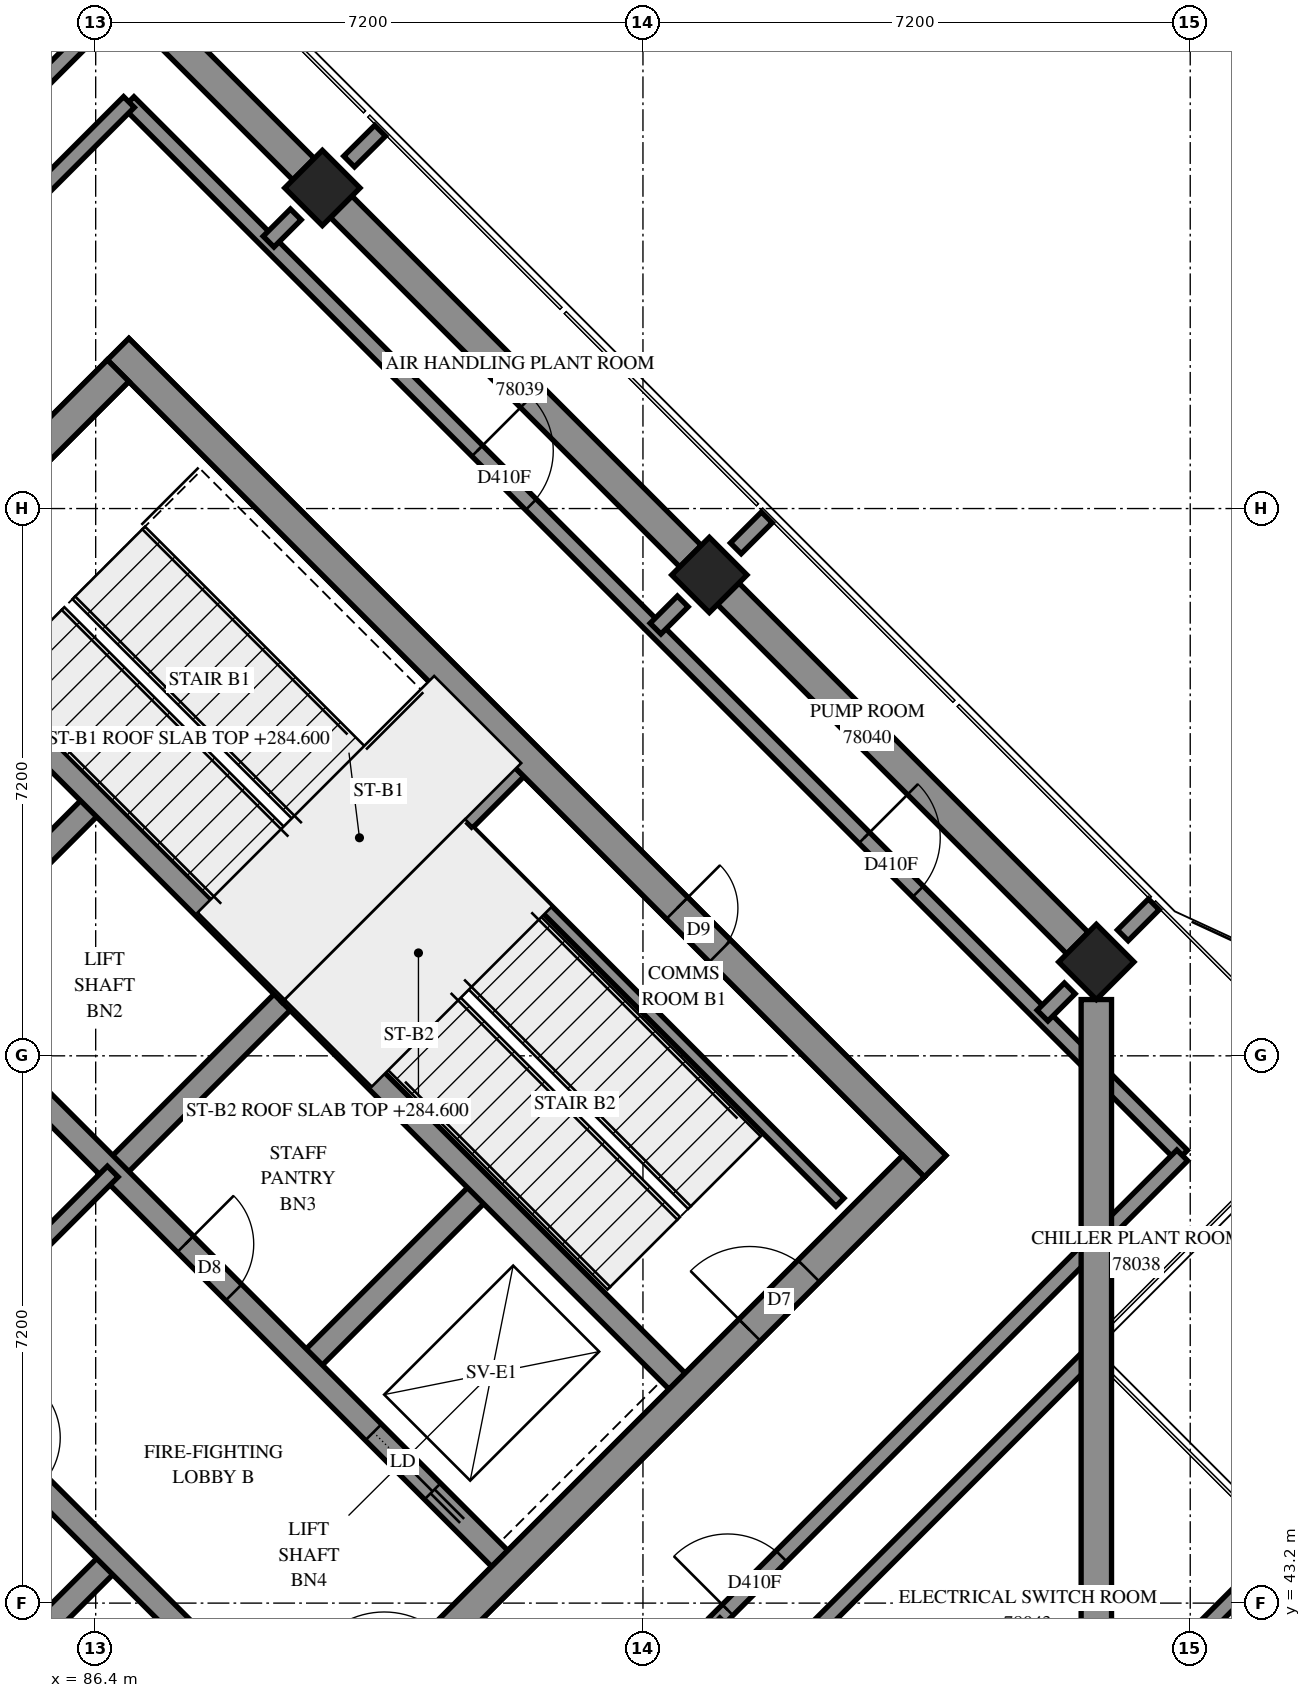
"""IFC4 building model, lengths in metres.
Left out: names, types, materials, properties, quantities, classifications, styles, units other than length and angle.
Written with IfcOpenShell. Run it as: python <this file> out.ifc"""

import sys

from ifc_helpers import new_model, si_unit, direction, frame, frame_2d, origin, origin_2d, place, context, subcontext, project, spatial, rectangle, extrude, element, fill, save


model = new_model("IFC4")
c1 = context("Model", 3, precision=1e-05, world=origin(), true_north=direction((0.0, 1.0)))
c2 = subcontext(c1, "Body", "Model", "MODEL_VIEW")
j1 = project(units=[si_unit("LENGTHUNIT", "METRE"), si_unit("PLANEANGLEUNIT", "RADIAN")], contexts=[c1])
p1 = place(None, origin())
s1 = spatial("IfcSite", under=j1, at=p1, CompositionType="ELEMENT")
p2 = place(p1, origin())
s2 = spatial("IfcBuilding", under=s1, at=p2, CompositionType="ELEMENT")
p3 = place(p2, frame((0.0, 0.0, 284.6)))
s3 = spatial("IfcBuildingStorey", under=s2, at=p3, CompositionType="ELEMENT", Elevation=284.6)
for number, where, z_axis, x_axis in (
    (1, (89.382, 61.818, 0.0), (0.0, 0.0, 1.0), (0.707, -0.707, 0.0)),
    (2, (94.474, 56.727, 0.0), (0.0, 0.0, 1.0), (0.707, -0.707, 0.0)),
    (3, (99.565, 51.635, 0.0), (0.0, 0.0, 1.0), (0.707, -0.707, 0.0)),
):
    element("IfcColumn", number, at=place(p3, frame(where, z_axis=z_axis, x_axis=x_axis)), inside=s3, PredefinedType="COLUMN", context=c2, shape_type="SweptSolid", body=[
        extrude(rectangle(XDim=0.7, YDim=0.7, at=origin_2d()), origin(), (0.0, 0.0, 1.0), 5.7),
    ])
p4 = place(p3, frame((76.23, 49.231, -0.3), z_axis=(0.0, 0.0, 1.0), x_axis=(0.7071034917, -0.7071100706, 0.0)))
e4 = element("IfcWall", 4, at=p4, inside=s3, PredefinedType="SHEAR", context=c2, shape_type="SweptSolid", body=[
    extrude(rectangle(XDim=15.2, YDim=0.4, at=frame_2d((7.6, 0.0))), origin(), (0.0, 0.0, 1.0), 5.3),
])
p5 = place(p3, frame((86.695, 59.696, -0.3), z_axis=(0.0, 0.0, 1.0), x_axis=(0.7071100706, -0.7071034917, 0.0)))
e5 = element("IfcWall", 5, at=p5, inside=s3, PredefinedType="SHEAR", context=c2, shape_type="SweptSolid", body=[
    extrude(rectangle(XDim=15.2, YDim=0.4, at=frame_2d((7.6, 0.0))), origin(), (0.0, 0.0, 1.0), 5.3),
])
p6 = place(p5, frame((10.4, 0.0, 0.3)))
e6 = element("IfcOpeningElement", 6, at=p6, cuts=e5, PredefinedType="OPENING", context=c2, shape_type="SweptSolid", body=[
    extrude(rectangle(XDim=0.8, YDim=2.1, at=frame_2d((0.4, 1.05))), frame((0.0, 0.21, 0.0), z_axis=(0.0, -1.0, 0.0), x_axis=(1.0, 0.0, 0.0)), (0.0, 0.0, 1.0), 0.42),
])
p7 = place(p3, frame((76.513, 49.231, -0.3), z_axis=(0.0, 0.0, 1.0), x_axis=(0.7071067812, 0.7071067812, 0.0)))
e7 = element("IfcWall", 7, at=p7, inside=s3, PredefinedType="SHEAR", context=c2, shape_type="SweptSolid", body=[
    extrude(rectangle(XDim=14.4, YDim=0.4, at=frame_2d((7.2, 0.0))), origin(), (0.0, 0.0, 1.0), 5.3),
])
p8 = place(p7, frame((4.55, 0.0, 0.3)))
e8 = element("IfcOpeningElement", 8, at=p8, cuts=e7, PredefinedType="OPENING", context=c2, shape_type="SweptSolid", body=[
    extrude(rectangle(XDim=1.1, YDim=2.1, at=frame_2d((0.55, 1.05))), frame((0.0, 0.21, 0.0), z_axis=(0.0, -1.0, 0.0), x_axis=(1.0, 0.0, 0.0)), (0.0, 0.0, 1.0), 0.42),
])
p9 = place(p7, frame((11.35, 0.0, 0.3)))
e9 = element("IfcOpeningElement", 9, at=p9, cuts=e7, PredefinedType="OPENING", context=c2, shape_type="SweptSolid", body=[
    extrude(rectangle(XDim=1.1, YDim=2.1, at=frame_2d((0.55, 1.05))), frame((0.0, 0.21, 0.0), z_axis=(0.0, -1.0, 0.0), x_axis=(1.0, 0.0, 0.0)), (0.0, 0.0, 1.0), 0.42),
])
p10 = place(p3, frame((86.978, 38.766, -0.3), z_axis=(0.0, 0.0, 1.0), x_axis=(0.7071067812, 0.7071067812, 0.0)))
e10 = element("IfcWall", 10, at=p10, inside=s3, PredefinedType="SHEAR", context=c2, shape_type="SweptSolid", body=[
    extrude(rectangle(XDim=14.4, YDim=0.4, at=frame_2d((7.2, 0.0))), origin(), (0.0, 0.0, 1.0), 5.3),
])
p11 = place(p10, frame((4.55, 0.0, 0.3)))
e11 = element("IfcOpeningElement", 11, at=p11, cuts=e10, PredefinedType="OPENING", context=c2, shape_type="SweptSolid", body=[
    extrude(rectangle(XDim=1.1, YDim=2.1, at=frame_2d((0.55, 1.05))), frame((0.0, 0.21, 0.0), z_axis=(0.0, -1.0, 0.0), x_axis=(1.0, 0.0, 0.0)), (0.0, 0.0, 1.0), 0.42),
])
p12 = place(p10, frame((11.35, 0.0, 0.3)))
e12 = element("IfcOpeningElement", 12, at=p12, cuts=e10, PredefinedType="OPENING", context=c2, shape_type="SweptSolid", body=[
    extrude(rectangle(XDim=1.1, YDim=2.1, at=frame_2d((0.55, 1.05))), frame((0.0, 0.21, 0.0), z_axis=(0.0, -1.0, 0.0), x_axis=(1.0, 0.0, 0.0)), (0.0, 0.0, 1.0), 0.42),
])
p13 = place(p3, frame((84.079, 51.423, 0.0), z_axis=(0.0, 0.0, 1.0), x_axis=(0.7071219326, 0.7070916295, 0.0)))
e13 = element("IfcWall", 13, at=p13, inside=s3, PredefinedType="SOLIDWALL", context=c2, shape_type="SweptSolid", body=[
    extrude(rectangle(XDim=3.3, YDim=0.3, at=frame_2d((1.65, 0.0))), origin(), (0.0, 0.0, 1.0), 5.7),
])
p14 = place(p3, frame((86.625, 48.878, 0.0), z_axis=(0.0, 0.0, 1.0), x_axis=(0.7071067812, 0.7071067812, 0.0)))
e14 = element("IfcWall", 14, at=p14, inside=s3, PredefinedType="SOLIDWALL", context=c2, shape_type="SweptSolid", body=[
    extrude(rectangle(XDim=3.3, YDim=0.3, at=frame_2d((1.65, 0.0))), origin(), (0.0, 0.0, 1.0), 5.7),
])
p15 = place(p3, frame((84.291, 41.453, 0.0), z_axis=(0.0, 0.0, 1.0), x_axis=(0.7071067812, 0.7071067812, 0.0)))
e15 = element("IfcWall", 15, at=p15, inside=s3, PredefinedType="SOLIDWALL", context=c2, shape_type="SweptSolid", body=[
    extrude(rectangle(XDim=3.3, YDim=0.3, at=frame_2d((1.65, 0.0))), origin(), (0.0, 0.0, 1.0), 5.7),
])
p16 = place(p3, frame((89.17, 46.332, 0.0), z_axis=(0.0, 0.0, 1.0), x_axis=(0.7071067812, 0.7071067812, 0.0)))
e16 = element("IfcWall", 16, at=p16, inside=s3, PredefinedType="SOLIDWALL", context=c2, shape_type="SweptSolid", body=[
    extrude(rectangle(XDim=3.3, YDim=0.3, at=frame_2d((1.65, 0.0))), origin(), (0.0, 0.0, 1.0), 5.7),
])
p17 = place(p3, frame((78.988, 51.423, 0.0), z_axis=(0.0, 0.0, 1.0), x_axis=(0.7071067812, -0.7071067812, 0.0)))
e17 = element("IfcWall", 17, at=p17, inside=s3, PredefinedType="SOLIDWALL", context=c2, shape_type="SweptSolid", body=[
    extrude(rectangle(XDim=14.4, YDim=0.3, at=frame_2d((7.2, 0.0))), origin(), (0.0, 0.0, 1.0), 5.7),
])
p18 = place(p17, frame((1.35, 0.0, 0.0)))
e18 = element("IfcOpeningElement", 18, at=p18, cuts=e17, PredefinedType="OPENING", context=c2, shape_type="SweptSolid", body=[
    extrude(rectangle(XDim=0.9, YDim=2.1, at=frame_2d((0.45, 1.05))), frame((0.0, 0.16, 0.0), z_axis=(0.0, -1.0, 0.0), x_axis=(1.0, 0.0, 0.0)), (0.0, 0.0, 1.0), 0.32),
])
p19 = place(p17, frame((4.95, 0.0, 0.0)))
e19 = element("IfcOpeningElement", 19, at=p19, cuts=e17, PredefinedType="OPENING", context=c2, shape_type="SweptSolid", body=[
    extrude(rectangle(XDim=0.9, YDim=2.1, at=frame_2d((0.45, 1.05))), frame((0.0, 0.16, 0.0), z_axis=(0.0, -1.0, 0.0), x_axis=(1.0, 0.0, 0.0)), (0.0, 0.0, 1.0), 0.32),
])
p20 = place(p17, frame((8.55, 0.0, 0.0)))
e20 = element("IfcOpeningElement", 20, at=p20, cuts=e17, PredefinedType="OPENING", context=c2, shape_type="SweptSolid", body=[
    extrude(rectangle(XDim=0.9, YDim=2.1, at=frame_2d((0.45, 1.05))), frame((0.0, 0.16, 0.0), z_axis=(0.0, -1.0, 0.0), x_axis=(1.0, 0.0, 0.0)), (0.0, 0.0, 1.0), 0.32),
])
p21 = place(p17, frame((12.05, 0.0, 0.0)))
e21 = element("IfcOpeningElement", 21, at=p21, cuts=e17, PredefinedType="OPENING", context=c2, shape_type="SweptSolid", body=[
    extrude(rectangle(XDim=1.1, YDim=2.1, at=frame_2d((0.55, 1.05))), frame((0.0, 0.16, 0.0), z_axis=(0.0, -1.0, 0.0), x_axis=(1.0, 0.0, 0.0)), (0.0, 0.0, 1.0), 0.32),
])
p22 = place(p3, frame((81.534, 53.969, 0.0), z_axis=(0.0, 0.0, 1.0), x_axis=(0.707103309, -0.7071102534, 0.0)))
e22 = element("IfcWall", 22, at=p22, inside=s3, PredefinedType="SOLIDWALL", context=c2, shape_type="SweptSolid", body=[
    extrude(rectangle(XDim=14.4, YDim=0.3, at=frame_2d((7.2, 0.0))), origin(), (0.0, 0.0, 1.0), 5.7),
])
p23 = place(p22, frame((8.55, 0.0, 0.0)))
e23 = element("IfcOpeningElement", 23, at=p23, cuts=e22, PredefinedType="OPENING", context=c2, shape_type="SweptSolid", body=[
    extrude(rectangle(XDim=0.9, YDim=2.1, at=frame_2d((0.45, 1.05))), frame((0.0, 0.16, 0.0), z_axis=(0.0, -1.0, 0.0), x_axis=(1.0, 0.0, 0.0)), (0.0, 0.0, 1.0), 0.32),
])
p24 = place(p22, frame((12.05, 0.0, 0.0)))
e24 = element("IfcOpeningElement", 24, at=p24, cuts=e22, PredefinedType="OPENING", context=c2, shape_type="SweptSolid", body=[
    extrude(rectangle(XDim=1.1, YDim=2.1, at=frame_2d((0.55, 1.05))), frame((0.0, 0.16, 0.0), z_axis=(0.0, -1.0, 0.0), x_axis=(1.0, 0.0, 0.0)), (0.0, 0.0, 1.0), 0.32),
])
for number, where, z_axis, x_axis in (
    (25, (83.867, 56.302, 0.0), (0.0, 0.0, 1.0), (0.707, -0.707, 0.0)),
    (26, (88.958, 51.211, 0.0), (0.0, 0.0, 1.0), (0.707, -0.707, 0.0)),
):
    element("IfcWall", number, at=place(p3, frame(where, z_axis=z_axis, x_axis=x_axis)), inside=s3, PredefinedType="SOLIDWALL", context=c2, shape_type="SweptSolid", body=[
        extrude(rectangle(XDim=7.2, YDim=0.3, at=frame_2d((3.6, 0.0))), origin(), (0.0, 0.0, 1.0), 5.7),
    ])
p25 = place(p3, frame((88.958, 51.211, 0.0), z_axis=(0.0, 0.0, 1.0), x_axis=(0.7071067812, 0.7071067812, 0.0)))
e27 = element("IfcWall", 27, at=p25, inside=s3, PredefinedType="SOLIDWALL", context=c2, shape_type="SweptSolid", body=[
    extrude(rectangle(XDim=4.2, YDim=0.3, at=frame_2d((2.1, 0.0))), origin(), (0.0, 0.0, 1.0), 5.7),
])
p26 = place(p3, frame((91.313, 53.354, 0.0), z_axis=(0.0, 0.0, 1.0), x_axis=(0.7071140275, -0.7070995348, 0.0)))
e28 = element("IfcWall", 28, at=p26, inside=s3, PredefinedType="PARTITIONING", context=c2, shape_type="SweptSolid", body=[
    extrude(rectangle(XDim=6.9, YDim=0.15, at=frame_2d((3.45, 0.0))), origin(), (0.0, 0.0, 1.0), 5.7),
])
p27 = place(p3, frame((84.079, 46.332, 0.0), z_axis=(0.0, 0.0, 1.0), x_axis=(0.7071067812, 0.7071067812, 0.0)))
e29 = element("IfcWall", 29, at=p27, inside=s3, PredefinedType="PARTITIONING", context=c2, shape_type="SweptSolid", body=[
    extrude(rectangle(XDim=3.6, YDim=0.2, at=frame_2d((1.8, 0.0))), origin(), (0.0, 0.0, 1.0), 5.7),
])
p28 = place(p27, frame((1.25, 0.0, 0.0)))
e30 = element("IfcOpeningElement", 30, at=p28, cuts=e29, PredefinedType="OPENING", context=c2, shape_type="SweptSolid", body=[
    extrude(rectangle(XDim=1.1, YDim=2.1, at=frame_2d((0.55, 1.05))), frame((0.0, 0.11, 0.0), z_axis=(0.0, -1.0, 0.0), x_axis=(1.0, 0.0, 0.0)), (0.0, 0.0, 1.0), 0.22),
])
p29 = place(p3, frame((86.833, 62.947, 0.0), z_axis=(0.0, 0.0, 1.0), x_axis=(0.7071067812, -0.7071067812, 0.0)))
e31 = element("IfcWall", 31, at=p29, inside=s3, PredefinedType="PARTITIONING", context=c2, shape_type="SweptSolid", body=[
    extrude(rectangle(XDim=19.601, YDim=0.2, at=frame_2d((9.8, 0.0))), origin(), (0.0, 0.0, 1.0), 5.7),
])
p30 = place(p29, frame((6.487, 0.0, 0.0)))
e32 = element("IfcOpeningElement", 32, at=p30, cuts=e31, PredefinedType="OPENING", context=c2, shape_type="SweptSolid", body=[
    extrude(rectangle(XDim=1.0, YDim=2.1, at=frame_2d((0.5, 1.05))), frame((0.0, 0.11, 0.0), z_axis=(0.0, -1.0, 0.0), x_axis=(1.0, 0.0, 0.0)), (0.0, 0.0, 1.0), 0.22),
])
p31 = place(p29, frame((13.688, 0.0, 0.0)))
e33 = element("IfcOpeningElement", 33, at=p31, cuts=e31, PredefinedType="OPENING", context=c2, shape_type="SweptSolid", body=[
    extrude(rectangle(XDim=1.0, YDim=2.1, at=frame_2d((0.5, 1.05))), frame((0.0, 0.11, 0.0), z_axis=(0.0, -1.0, 0.0), x_axis=(1.0, 0.0, 0.0)), (0.0, 0.0, 1.0), 0.22),
])
p32 = place(p3, frame((80.799, 58.327, 0.0), z_axis=(0.0, 0.0, 1.0), x_axis=(0.7071067812, 0.7071067812, 0.0)))
e34 = element("IfcWall", 34, at=p32, inside=s3, PredefinedType="PARTITIONING", context=c2, shape_type="SweptSolid", body=[
    extrude(rectangle(XDim=9.608, YDim=0.2, at=frame_2d((4.804, 0.0))), origin(), (0.0, 0.0, 1.0), 5.7),
])
p33 = place(p3, frame((94.543, 42.939, 0.0), z_axis=(0.0, 0.0, 1.0), x_axis=(0.7071067812, 0.7071067812, 0.0)))
e35 = element("IfcWall", 35, at=p33, inside=s3, PredefinedType="PARTITIONING", context=c2, shape_type="SweptSolid", body=[
    extrude(rectangle(XDim=8.7, YDim=0.2, at=frame_2d((4.35, 0.0))), origin(), (0.0, 0.0, 1.0), 5.7),
])
p34 = place(p33, frame((0.242, 0.0, 0.0)))
e36 = element("IfcOpeningElement", 36, at=p34, cuts=e35, PredefinedType="OPENING", context=c2, shape_type="SweptSolid", body=[
    extrude(rectangle(XDim=1.0, YDim=2.1, at=frame_2d((0.5, 1.05))), frame((0.0, 0.11, 0.0), z_axis=(0.0, -1.0, 0.0), x_axis=(1.0, 0.0, 0.0)), (0.0, 0.0, 1.0), 0.22),
])
p35 = place(p3, frame((80.804, 56.912, 0.0), z_axis=(0.0, 0.0, 1.0), x_axis=(0.7069896038, 0.7072239391, 0.0)))
e37 = element("IfcWall", 37, at=p35, inside=s3, PredefinedType="PARTITIONING", context=c2, shape_type="SweptSolid", body=[
    extrude(rectangle(XDim=8.535, YDim=0.2, at=frame_2d((4.267, 0.0))), origin(), (0.0, 0.0, 1.0), 5.7),
])
p36 = place(p35, frame((0.859, 0.0, 0.0)))
e38 = element("IfcOpeningElement", 38, at=p36, cuts=e37, PredefinedType="OPENING", context=c2, shape_type="SweptSolid", body=[
    extrude(rectangle(XDim=1.0, YDim=2.1, at=frame_2d((0.5, 1.05))), frame((0.0, 0.11, 0.0), z_axis=(0.0, -1.0, 0.0), x_axis=(1.0, 0.0, 0.0)), (0.0, 0.0, 1.0), 0.22),
])
p37 = place(p3, frame((95.25, 42.232, 0.0), z_axis=(0.0, 0.0, 1.0), x_axis=(0.7071067812, 0.7071067812, 0.0)))
e39 = element("IfcWall", 39, at=p37, inside=s3, PredefinedType="PARTITIONING", context=c2, shape_type="SweptSolid", body=[
    extrude(rectangle(XDim=5.971, YDim=0.2, at=frame_2d((2.985, 0.0))), origin(), (0.0, 0.0, 1.0), 5.7),
])
p38 = place(p3, frame((94.541, 42.935, 0.0), z_axis=(0.0, 0.0, 1.0), x_axis=(0.7071067812, -0.7071067812, 0.0)))
e40 = element("IfcWall", 40, at=p38, inside=s3, PredefinedType="PARTITIONING", context=c2, shape_type="SweptSolid", body=[
    extrude(rectangle(XDim=4.599, YDim=0.2, at=frame_2d((2.3, 0.0))), origin(), (0.0, 0.0, 1.0), 5.7),
])
p39 = place(p38, frame((1.508, 0.0, 0.0)))
e41 = element("IfcOpeningElement", 41, at=p39, cuts=e40, PredefinedType="OPENING", context=c2, shape_type="SweptSolid", body=[
    extrude(rectangle(XDim=1.0, YDim=2.1, at=frame_2d((0.5, 1.05))), frame((0.0, 0.11, 0.0), z_axis=(0.0, -1.0, 0.0), x_axis=(1.0, 0.0, 0.0)), (0.0, 0.0, 1.0), 0.22),
])
p40 = place(p3, frame((99.214, 41.104, 0.0), z_axis=(0.0, 0.0, 1.0), x_axis=(0.7071067812, 0.7071067812, 0.0)))
e42 = element("IfcWall", 42, at=p40, inside=s3, PredefinedType="PARTITIONING", context=c2, shape_type="SweptSolid", body=[
    extrude(rectangle(XDim=3.966, YDim=0.2, at=frame_2d((1.983, 0.0))), origin(), (0.0, 0.0, 1.0), 5.7),
])
for number, where, z_axis, x_axis in (
    (43, (94.822, 57.076, 0.0), (0.0, 0.0, 1.0), (0.707, 0.707, 0.0)),
    (44, (99.913, 51.985, 0.0), (0.0, 0.0, 1.0), (0.707, 0.707, 0.0)),
):
    element("IfcWall", number, at=place(p3, frame(where, z_axis=z_axis, x_axis=x_axis)), inside=s3, PredefinedType="PARTITIONING", context=c2, shape_type="SweptSolid", body=[
        extrude(rectangle(XDim=0.577, YDim=0.2, at=frame_2d((0.288, 0.0))), origin(), (0.0, 0.0, 1.0), 5.7),
    ])
p41 = place(p3, frame((89.734, 62.166, 0.0), z_axis=(0.0, 0.0, 1.0), x_axis=(0.7088420047, 0.705367289, 0.0)))
e45 = element("IfcWall", 45, at=p41, inside=s3, PredefinedType="PARTITIONING", context=c2, shape_type="SweptSolid", body=[
    extrude(rectangle(XDim=0.576, YDim=0.2, at=frame_2d((0.288, 0.0))), origin(), (0.0, 0.0, 1.0), 5.7),
])
for number, where, z_axis, x_axis in (
    (46, (88.674, 61.111, 0.0), (0.0, 0.0, 1.0), (0.707, 0.707, 0.0)),
    (47, (93.766, 56.02, 0.0), (0.0, 0.0, 1.0), (0.707, 0.707, 0.0)),
    (48, (98.857, 50.929, 0.0), (0.0, 0.0, 1.0), (0.707, 0.707, 0.0)),
):
    element("IfcWall", number, at=place(p3, frame(where, z_axis=z_axis, x_axis=x_axis)), inside=s3, PredefinedType="PARTITIONING", context=c2, shape_type="SweptSolid", body=[
        extrude(rectangle(XDim=0.506, YDim=0.2, at=frame_2d((0.253, 0.0))), origin(), (0.0, 0.0, 1.0), 5.7),
    ])
p42 = place(p6, origin())
e49 = element("IfcDoor", 49, at=p42, inside=s3, OperationType="SINGLE_SWING_RIGHT", PredefinedType="DOOR", context=c2, shape_type="SweptSolid", body=[
    extrude(rectangle(XDim=0.8, YDim=2.1, at=frame_2d((0.4, 1.05))), frame((0.0, 0.025, 0.0), z_axis=(0.0, -1.0, 0.0), x_axis=(1.0, 0.0, 0.0)), (0.0, 0.0, 1.0), 0.05),
])
fill(e6, e49)
p43 = place(p12, origin())
e50 = element("IfcDoor", 50, at=p43, inside=s3, OperationType="SINGLE_SWING_RIGHT", PredefinedType="DOOR", context=c2, shape_type="SweptSolid", body=[
    extrude(rectangle(XDim=1.1, YDim=2.1, at=frame_2d((0.55, 1.05))), frame((0.0, 0.025, 0.0), z_axis=(0.0, -1.0, 0.0), x_axis=(1.0, 0.0, 0.0)), (0.0, 0.0, 1.0), 0.05),
])
fill(e12, e50)
p44 = place(p23, origin())
e51 = element("IfcDoor", 51, at=p44, inside=s3, OperationType="SINGLE_SWING_LEFT", PredefinedType="DOOR", context=c2, shape_type="SweptSolid", body=[
    extrude(rectangle(XDim=0.9, YDim=2.1, at=frame_2d((0.45, 1.05))), frame((0.0, 0.025, 0.0), z_axis=(0.0, -1.0, 0.0), x_axis=(1.0, 0.0, 0.0)), (0.0, 0.0, 1.0), 0.05),
])
fill(e23, e51)
p45 = place(p24, origin())
e52 = element("IfcDoor", 52, at=p45, inside=s3, OperationType="SLIDING_TO_RIGHT", PredefinedType="DOOR", context=c2, shape_type="SweptSolid", body=[
    extrude(rectangle(XDim=1.1, YDim=2.1, at=frame_2d((0.55, 1.05))), frame((0.0, 0.025, 0.0), z_axis=(0.0, -1.0, 0.0), x_axis=(1.0, 0.0, 0.0)), (0.0, 0.0, 1.0), 0.05),
])
fill(e24, e52)
p46 = place(p34, origin())
e53 = element("IfcDoor", 53, at=p46, inside=s3, OperationType="SINGLE_SWING_LEFT", PredefinedType="DOOR", context=c2, shape_type="SweptSolid", body=[
    extrude(rectangle(XDim=1.0, YDim=2.1, at=frame_2d((0.5, 1.05))), frame((0.0, 0.025, 0.0), z_axis=(0.0, -1.0, 0.0), x_axis=(1.0, 0.0, 0.0)), (0.0, 0.0, 1.0), 0.05),
])
fill(e36, e53)
p47 = place(p30, origin())
e54 = element("IfcDoor", 54, at=p47, inside=s3, OperationType="SINGLE_SWING_LEFT", PredefinedType="DOOR", context=c2, shape_type="SweptSolid", body=[
    extrude(rectangle(XDim=1.0, YDim=2.1, at=frame_2d((0.5, 1.05))), frame((0.0, 0.025, 0.0), z_axis=(0.0, -1.0, 0.0), x_axis=(1.0, 0.0, 0.0)), (0.0, 0.0, 1.0), 0.05),
])
fill(e32, e54)
p48 = place(p31, origin())
e55 = element("IfcDoor", 55, at=p48, inside=s3, OperationType="SINGLE_SWING_LEFT", PredefinedType="DOOR", context=c2, shape_type="SweptSolid", body=[
    extrude(rectangle(XDim=1.0, YDim=2.1, at=frame_2d((0.5, 1.05))), frame((0.0, 0.025, 0.0), z_axis=(0.0, -1.0, 0.0), x_axis=(1.0, 0.0, 0.0)), (0.0, 0.0, 1.0), 0.05),
])
fill(e33, e55)
save(model, sys.argv[1])
